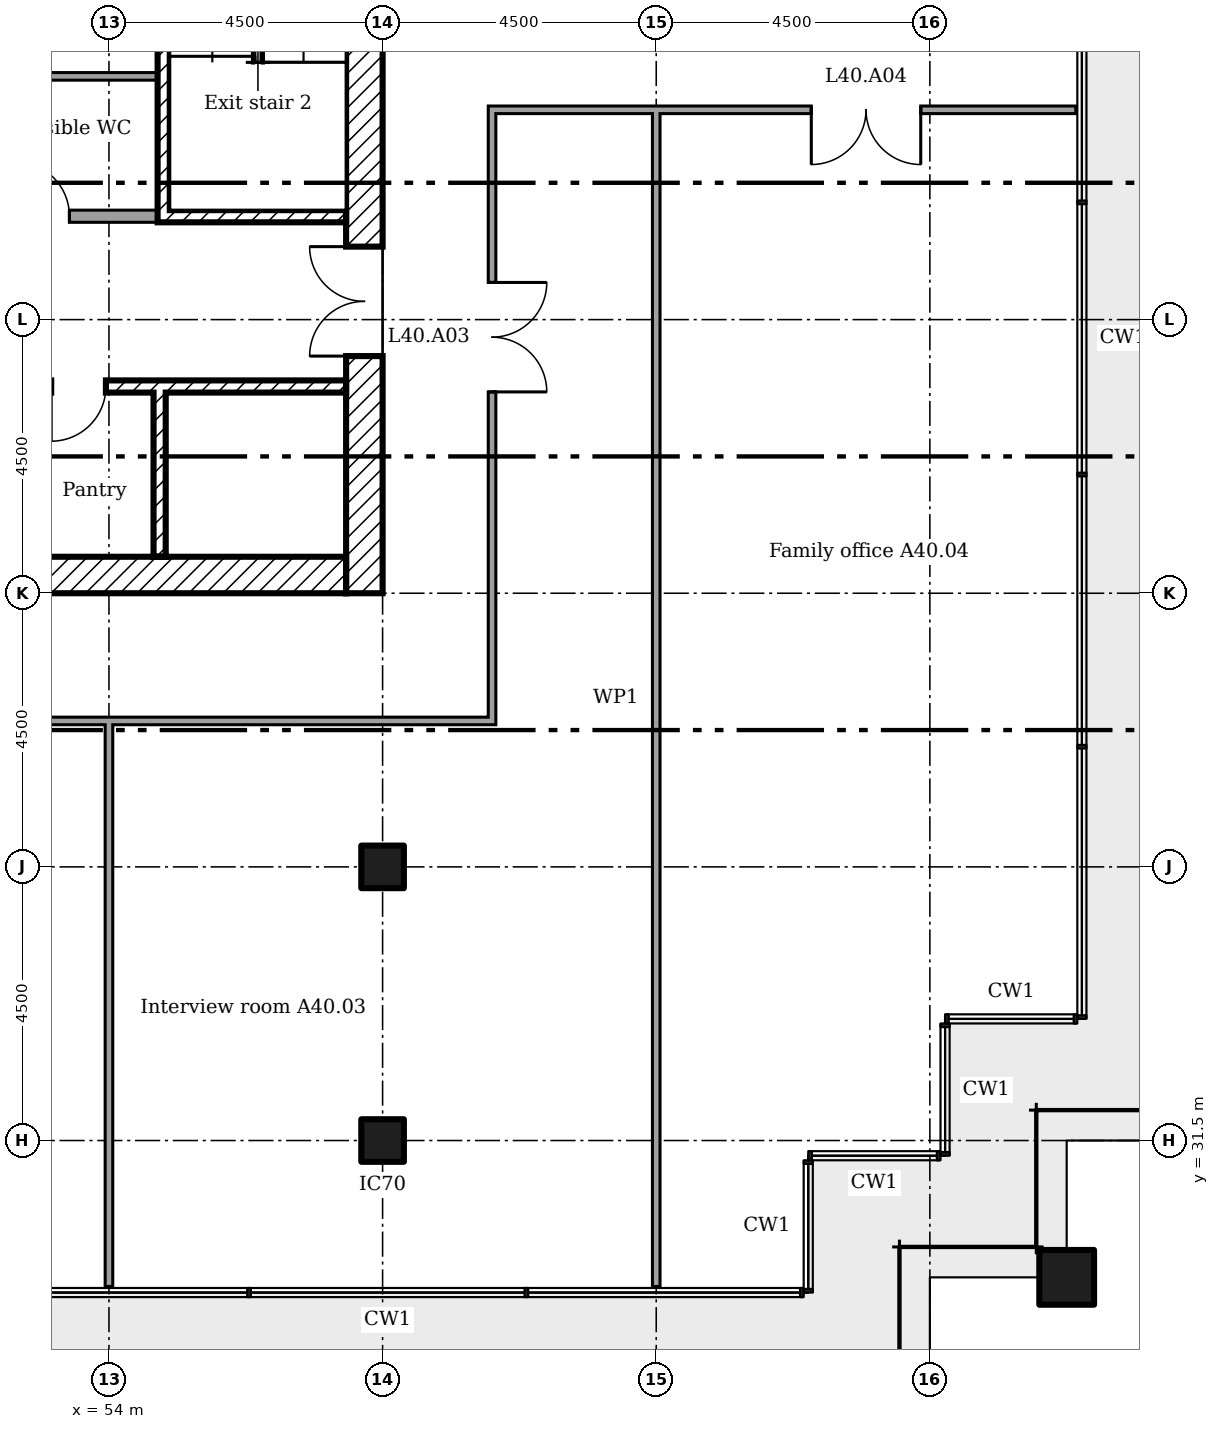
"""IFC4 building model, lengths in metres.
Left out: names, types, materials, properties, quantities, classifications, styles, units other than length and angle.
Written with IfcOpenShell. Run it as: python <this file> out.ifc"""

import sys

from ifc_helpers import new_model, si_unit, direction, frame, frame_2d, origin, origin_2d, place, context, subcontext, project, spatial, rectangle, extrude, element, fill, save


model = new_model("IFC4")
c1 = context("Model", 3, precision=1e-05, world=origin(), true_north=direction((0.0, 1.0)))
c2 = subcontext(c1, "Body", "Model", "MODEL_VIEW")
j1 = project(units=[si_unit("LENGTHUNIT", "METRE"), si_unit("PLANEANGLEUNIT", "RADIAN")], contexts=[c1])
p1 = place(None, origin())
s1 = spatial("IfcSite", under=j1, at=p1, CompositionType="ELEMENT")
p2 = place(p1, origin())
s2 = spatial("IfcBuilding", under=s1, at=p2, CompositionType="ELEMENT")
p3 = place(p2, frame((0.0, 0.0, 161.8)))
s3 = spatial("IfcBuildingStorey", under=s2, at=p3, CompositionType="ELEMENT", Elevation=161.8)
p4 = place(p3, frame((69.75, 29.25, 0.0)))
e1 = element("IfcColumn", 1, at=p4, inside=s3, PredefinedType="COLUMN", context=c2, shape_type="SweptSolid", body=[
    extrude(rectangle(XDim=0.9, YDim=0.9, at=origin_2d()), origin(), (0.0, 0.0, 1.0), 3.6),
])
for number, where in (
    (2, (58.5, 31.5, 0.0)),
    (3, (58.5, 36.0, 0.0)),
):
    element("IfcColumn", number, at=place(p3, frame(where)), inside=s3, PredefinedType="COLUMN", context=c2, shape_type="SweptSolid", body=[
        extrude(rectangle(XDim=0.7, YDim=0.7, at=origin_2d()), origin(), (0.0, 0.0, 1.0), 3.6),
    ])
p5 = place(p3, frame((58.2, 40.5, 0.0), z_axis=(0.0, 0.0, 1.0), x_axis=(0.0, 1.0, 0.0)))
e4 = element("IfcWall", 4, at=p5, inside=s3, PredefinedType="SHEAR", context=c2, shape_type="SweptSolid", body=[
    extrude(rectangle(XDim=18.0, YDim=0.6, at=frame_2d((9.0, 0.0))), origin(), (0.0, 0.0, 1.0), 3.35),
])
p6 = place(p5, frame((13.15, 0.0, 0.0)))
e5 = element("IfcOpeningElement", 5, at=p6, cuts=e4, PredefinedType="OPENING", context=c2, shape_type="SweptSolid", body=[
    extrude(rectangle(XDim=1.2, YDim=2.1, at=frame_2d((0.6, 1.05))), frame((0.0, 0.31, 0.0), z_axis=(0.0, -1.0, 0.0), x_axis=(1.0, 0.0, 0.0)), (0.0, 0.0, 1.0), 0.62),
])
p7 = place(p5, frame((3.9, 0.0, 0.0)))
e6 = element("IfcOpeningElement", 6, at=p7, cuts=e4, PredefinedType="OPENING", context=c2, shape_type="SweptSolid", body=[
    extrude(rectangle(XDim=1.8, YDim=2.1, at=frame_2d((0.9, 1.05))), frame((0.0, 0.31, 0.0), z_axis=(0.0, -1.0, 0.0), x_axis=(1.0, 0.0, 0.0)), (0.0, 0.0, 1.0), 0.62),
])
p8 = place(p5, frame((11.525, 0.0, 0.0)))
e7 = element("IfcOpeningElement", 7, at=p8, cuts=e4, PredefinedType="OPENING", context=c2, shape_type="SweptSolid", body=[
    extrude(rectangle(XDim=1.0, YDim=2.1, at=frame_2d((0.5, 1.05))), frame((0.0, 0.31, 0.0), z_axis=(0.0, -1.0, 0.0), x_axis=(1.0, 0.0, 0.0)), (0.0, 0.0, 1.0), 0.62),
])
p9 = place(p3, frame((40.5, 40.8, 0.0)))
e8 = element("IfcWall", 8, at=p9, inside=s3, PredefinedType="SHEAR", context=c2, shape_type="SweptSolid", body=[
    extrude(rectangle(XDim=17.4, YDim=0.6, at=frame_2d((8.7, 0.0))), origin(), (0.0, 0.0, 1.0), 3.35),
])
p10 = place(p3, frame((54.833, 41.1, 0.0), z_axis=(0.0, 0.0, 1.0), x_axis=(0.0, 1.0, 0.0)))
e9 = element("IfcWall", 9, at=p10, inside=s3, PredefinedType="SHEAR", context=c2, shape_type="SweptSolid", body=[
    extrude(rectangle(XDim=2.7, YDim=0.2, at=frame_2d((1.35, 0.0))), origin(), (0.0, 0.0, 1.0), 3.35),
])
p11 = place(p3, frame((41.1, 43.9, 0.0)))
e10 = element("IfcWall", 10, at=p11, inside=s3, PredefinedType="SHEAR", context=c2, shape_type="SweptSolid", body=[
    extrude(rectangle(XDim=16.8, YDim=0.2, at=frame_2d((8.4, 0.0))), origin(), (0.0, 0.0, 1.0), 3.35),
])
p12 = place(p11, frame((1.283, 0.0, 0.0)))
e11 = element("IfcOpeningElement", 11, at=p12, cuts=e10, PredefinedType="OPENING", context=c2, shape_type="SweptSolid", body=[
    extrude(rectangle(XDim=0.9, YDim=2.1, at=frame_2d((0.45, 1.05))), frame((0.0, 0.11, 0.0), z_axis=(0.0, -1.0, 0.0), x_axis=(1.0, 0.0, 0.0)), (0.0, 0.0, 1.0), 0.22),
])
p13 = place(p11, frame((3.95, 0.0, 0.0)))
e12 = element("IfcOpeningElement", 12, at=p13, cuts=e10, PredefinedType="OPENING", context=c2, shape_type="SweptSolid", body=[
    extrude(rectangle(XDim=0.9, YDim=2.1, at=frame_2d((0.45, 1.05))), frame((0.0, 0.11, 0.0), z_axis=(0.0, -1.0, 0.0), x_axis=(1.0, 0.0, 0.0)), (0.0, 0.0, 1.0), 0.22),
])
p14 = place(p11, frame((6.617, 0.0, 0.0)))
e13 = element("IfcOpeningElement", 13, at=p14, cuts=e10, PredefinedType="OPENING", context=c2, shape_type="SweptSolid", body=[
    extrude(rectangle(XDim=0.9, YDim=2.1, at=frame_2d((0.45, 1.05))), frame((0.0, 0.11, 0.0), z_axis=(0.0, -1.0, 0.0), x_axis=(1.0, 0.0, 0.0)), (0.0, 0.0, 1.0), 0.22),
])
p15 = place(p11, frame((9.283, 0.0, 0.0)))
e14 = element("IfcOpeningElement", 14, at=p15, cuts=e10, PredefinedType="OPENING", context=c2, shape_type="SweptSolid", body=[
    extrude(rectangle(XDim=0.9, YDim=2.1, at=frame_2d((0.45, 1.05))), frame((0.0, 0.11, 0.0), z_axis=(0.0, -1.0, 0.0), x_axis=(1.0, 0.0, 0.0)), (0.0, 0.0, 1.0), 0.22),
])
p16 = place(p11, frame((11.95, 0.0, 0.0)))
e15 = element("IfcOpeningElement", 15, at=p16, cuts=e10, PredefinedType="OPENING", context=c2, shape_type="SweptSolid", body=[
    extrude(rectangle(XDim=0.9, YDim=2.1, at=frame_2d((0.45, 1.05))), frame((0.0, 0.11, 0.0), z_axis=(0.0, -1.0, 0.0), x_axis=(1.0, 0.0, 0.0)), (0.0, 0.0, 1.0), 0.22),
])
p17 = place(p3, frame((54.8, 46.7, 0.0)))
e16 = element("IfcWall", 16, at=p17, inside=s3, PredefinedType="SHEAR", context=c2, shape_type="SweptSolid", body=[
    extrude(rectangle(XDim=3.1, YDim=0.2, at=frame_2d((1.55, 0.0))), origin(), (0.0, 0.0, 1.0), 3.35),
])
p18 = place(p3, frame((54.9, 46.8, 0.0), z_axis=(0.0, 0.0, 1.0), x_axis=(0.0, 1.0, 0.0)))
e17 = element("IfcWall", 17, at=p18, inside=s3, PredefinedType="SHEAR", context=c2, shape_type="SweptSolid", body=[
    extrude(rectangle(XDim=6.5, YDim=0.2, at=frame_2d((3.25, 0.0))), origin(), (0.0, 0.0, 1.0), 3.35),
])
p19 = place(p3, frame((44.2, 46.7, 0.0)))
e18 = element("IfcWall", 18, at=p19, inside=s3, PredefinedType="PARTITIONING", context=c2, shape_type="SweptSolid", body=[
    extrude(rectangle(XDim=10.6, YDim=0.2, at=frame_2d((5.3, 0.0))), origin(), (0.0, 0.0, 1.0), 3.35),
])
p20 = place(p19, frame((1.15, 0.0, 0.0)))
e19 = element("IfcOpeningElement", 19, at=p20, cuts=e18, PredefinedType="OPENING", context=c2, shape_type="SweptSolid", body=[
    extrude(rectangle(XDim=0.9, YDim=2.1, at=frame_2d((0.45, 1.05))), frame((0.0, 0.11, 0.0), z_axis=(0.0, -1.0, 0.0), x_axis=(1.0, 0.0, 0.0)), (0.0, 0.0, 1.0), 0.22),
])
p21 = place(p19, frame((8.25, 0.0, 0.0)))
e20 = element("IfcOpeningElement", 20, at=p21, cuts=e18, PredefinedType="OPENING", context=c2, shape_type="SweptSolid", body=[
    extrude(rectangle(XDim=0.9, YDim=2.1, at=frame_2d((0.45, 1.05))), frame((0.0, 0.11, 0.0), z_axis=(0.0, -1.0, 0.0), x_axis=(1.0, 0.0, 0.0)), (0.0, 0.0, 1.0), 0.22),
])
p22 = place(p3, frame((54.8, 49.0, 0.0), z_axis=(0.0, 0.0, 1.0), x_axis=(-1.0, 0.0, 0.0)))
e21 = element("IfcWall", 21, at=p22, inside=s3, PredefinedType="PARTITIONING", context=c2, shape_type="SweptSolid", body=[
    extrude(rectangle(XDim=3.738, YDim=0.125, at=frame_2d((1.869, 0.0))), origin(), (0.0, 0.0, 1.0), 3.35),
])
p23 = place(p3, frame((42.5, 38.4, 0.0)))
e22 = element("IfcWall", 22, at=p23, inside=s3, PredefinedType="PARTITIONING", context=c2, shape_type="SweptSolid", body=[
    extrude(rectangle(XDim=17.863, YDim=0.125, at=frame_2d((8.931, 0.0))), origin(), (0.0, 0.0, 1.0), 3.45),
])
p24 = place(p23, frame((0.35, 0.0, 0.0)))
e23 = element("IfcOpeningElement", 23, at=p24, cuts=e22, PredefinedType="OPENING", context=c2, shape_type="SweptSolid", body=[
    extrude(rectangle(XDim=1.8, YDim=2.1, at=frame_2d((0.9, 1.05))), frame((0.0, 0.073, 0.0), z_axis=(0.0, -1.0, 0.0), x_axis=(1.0, 0.0, 0.0)), (0.0, 0.0, 1.0), 0.145),
])
p25 = place(p23, frame((5.258, 0.0, 0.0)))
e24 = element("IfcOpeningElement", 24, at=p25, cuts=e22, PredefinedType="OPENING", context=c2, shape_type="SweptSolid", body=[
    extrude(rectangle(XDim=1.0, YDim=2.1, at=frame_2d((0.5, 1.05))), frame((0.0, 0.073, 0.0), z_axis=(0.0, -1.0, 0.0), x_axis=(1.0, 0.0, 0.0)), (0.0, 0.0, 1.0), 0.145),
])
p26 = place(p3, frame((60.238, 48.45, 0.0)))
e25 = element("IfcWall", 25, at=p26, inside=s3, PredefinedType="PARTITIONING", context=c2, shape_type="SweptSolid", body=[
    extrude(rectangle(XDim=9.662, YDim=0.125, at=frame_2d((4.831, 0.0))), origin(), (0.0, 0.0, 1.0), 3.45),
])
p27 = place(p26, frame((5.312, 0.0, 0.0)))
e26 = element("IfcOpeningElement", 26, at=p27, cuts=e25, PredefinedType="OPENING", context=c2, shape_type="SweptSolid", body=[
    extrude(rectangle(XDim=1.8, YDim=2.1, at=frame_2d((0.9, 1.05))), frame((0.0, 0.073, 0.0), z_axis=(0.0, -1.0, 0.0), x_axis=(1.0, 0.0, 0.0)), (0.0, 0.0, 1.0), 0.145),
])
p28 = place(p3, frame((54.0, 29.1, 0.0), z_axis=(0.0, 0.0, 1.0), x_axis=(0.0, 1.0, 0.0)))
e27 = element("IfcWall", 27, at=p28, inside=s3, PredefinedType="PARTITIONING", context=c2, shape_type="SweptSolid", body=[
    extrude(rectangle(XDim=9.3, YDim=0.125, at=frame_2d((4.65, 0.0))), origin(), (0.0, 0.0, 1.0), 2.766),
])
p29 = place(p3, frame((60.3, 38.462, 0.0), z_axis=(0.0, 0.0, 1.0), x_axis=(0.0, 1.0, 0.0)))
e28 = element("IfcWall", 28, at=p29, inside=s3, PredefinedType="PARTITIONING", context=c2, shape_type="SweptSolid", body=[
    extrude(rectangle(XDim=9.925, YDim=0.125, at=frame_2d((4.962, 0.0))), origin(), (0.0, 0.0, 1.0), 3.45),
])
p30 = place(p29, frame((5.348, 0.0, 0.0)))
e29 = element("IfcOpeningElement", 29, at=p30, cuts=e28, PredefinedType="OPENING", context=c2, shape_type="SweptSolid", body=[
    extrude(rectangle(XDim=1.8, YDim=2.1, at=frame_2d((0.9, 1.05))), frame((0.0, 0.073, 0.0), z_axis=(0.0, -1.0, 0.0), x_axis=(1.0, 0.0, 0.0)), (0.0, 0.0, 1.0), 0.145),
])
p31 = place(p3, frame((63.0, 29.1, 0.0), z_axis=(0.0, 0.0, 1.0), x_axis=(0.0, 1.0, 0.0)))
e30 = element("IfcWall", 30, at=p31, inside=s3, PredefinedType="PARTITIONING", context=c2, shape_type="SweptSolid", body=[
    extrude(rectangle(XDim=19.35, YDim=0.125, at=frame_2d((9.675, 0.0))), origin(), (0.0, 0.0, 1.0), 3.45),
])
p32 = place(p7, origin())
e31 = element("IfcDoor", 31, at=p32, inside=s3, OperationType="DOUBLE_DOOR_SINGLE_SWING", PredefinedType="DOOR", context=c2, shape_type="SweptSolid", body=[
    extrude(rectangle(XDim=1.8, YDim=2.1, at=frame_2d((0.9, 1.05))), frame((0.0, 0.025, 0.0), z_axis=(0.0, -1.0, 0.0), x_axis=(1.0, 0.0, 0.0)), (0.0, 0.0, 1.0), 0.05),
])
fill(e6, e31)
p33 = place(p16, frame((0.9, 0.0, 0.0), x_axis=(-1.0, 0.0, 0.0)))
e32 = element("IfcDoor", 32, at=p33, inside=s3, OperationType="SINGLE_SWING_LEFT", PredefinedType="DOOR", context=c2, shape_type="SweptSolid", body=[
    extrude(rectangle(XDim=0.9, YDim=2.1, at=frame_2d((0.45, 1.05))), frame((0.0, 0.025, 0.0), z_axis=(0.0, -1.0, 0.0), x_axis=(1.0, 0.0, 0.0)), (0.0, 0.0, 1.0), 0.05),
])
fill(e15, e32)
p34 = place(p21, origin())
e33 = element("IfcDoor", 33, at=p34, inside=s3, OperationType="SINGLE_SWING_RIGHT", PredefinedType="DOOR", context=c2, shape_type="SweptSolid", body=[
    extrude(rectangle(XDim=0.9, YDim=2.1, at=frame_2d((0.45, 1.05))), frame((0.0, 0.025, 0.0), z_axis=(0.0, -1.0, 0.0), x_axis=(1.0, 0.0, 0.0)), (0.0, 0.0, 1.0), 0.05),
])
fill(e20, e33)
p35 = place(p30, frame((1.8, 0.0, 0.0), x_axis=(-1.0, 0.0, 0.0)))
e34 = element("IfcDoor", 34, at=p35, inside=s3, OperationType="DOUBLE_DOOR_SINGLE_SWING", PredefinedType="DOOR", context=c2, shape_type="SweptSolid", body=[
    extrude(rectangle(XDim=1.8, YDim=2.1, at=frame_2d((0.9, 1.05))), frame((0.0, 0.025, 0.0), z_axis=(0.0, -1.0, 0.0), x_axis=(1.0, 0.0, 0.0)), (0.0, 0.0, 1.0), 0.05),
])
fill(e29, e34)
p36 = place(p27, frame((1.8, 0.0, 0.0), x_axis=(-1.0, 0.0, 0.0)))
e35 = element("IfcDoor", 35, at=p36, inside=s3, OperationType="DOUBLE_DOOR_SINGLE_SWING", PredefinedType="DOOR", context=c2, shape_type="SweptSolid", body=[
    extrude(rectangle(XDim=1.8, YDim=2.1, at=frame_2d((0.9, 1.05))), frame((0.0, 0.025, 0.0), z_axis=(0.0, -1.0, 0.0), x_axis=(1.0, 0.0, 0.0)), (0.0, 0.0, 1.0), 0.05),
])
fill(e26, e35)
save(model, sys.argv[1])
